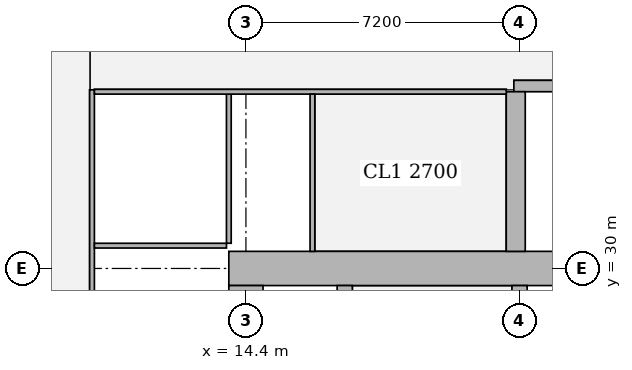
"""IFC4 building model, lengths in metres.
Left out: names, types, materials, properties, quantities, classifications, styles, units other than length and angle.
Written with IfcOpenShell. Run it as: python <this file> out.ifc"""

import sys

from ifc_helpers import new_model, si_unit, direction, frame, frame_2d, origin, place, context, subcontext, project, spatial, rectangle, extrude, element, fill, save


model = new_model("IFC4")
c1 = context("Model", 3, precision=1e-05, world=origin(), true_north=direction((0.0, 1.0)))
c2 = subcontext(c1, "Body", "Model", "MODEL_VIEW")
j1 = project(units=[si_unit("LENGTHUNIT", "METRE"), si_unit("PLANEANGLEUNIT", "RADIAN")], contexts=[c1])
p1 = place(None, origin())
s1 = spatial("IfcSite", under=j1, at=p1, CompositionType="ELEMENT")
p2 = place(p1, origin())
s2 = spatial("IfcBuilding", under=s1, at=p2, CompositionType="ELEMENT")
p3 = place(p2, frame((0.0, 0.0, 180.8)))
s3 = spatial("IfcBuildingStorey", under=s2, at=p3, CompositionType="ELEMENT", Elevation=180.8)
p4 = place(p3, frame((13.95, 30.0, 0.0), z_axis=(0.0, 0.0, 1.0), x_axis=(1.0, 0.0, 0.0)))
e1 = element("IfcWall", 1, at=p4, inside=s3, PredefinedType="SHEAR", context=c2, shape_type="SweptSolid", body=[
    extrude(rectangle(XDim=15.3, YDim=0.9, at=frame_2d((7.65, 0.0))), origin(), (0.0, 0.0, 1.0), 3.75),
])
p5 = place(p4, frame((4.45, 0.0, 0.0)))
e2 = element("IfcOpeningElement", 2, at=p5, cuts=e1, PredefinedType="OPENING", context=c2, shape_type="SweptSolid", body=[
    extrude(rectangle(XDim=1.8, YDim=2.1, at=frame_2d((0.9, 1.05))), frame((0.0, 0.46, 0.0), z_axis=(0.0, -1.0, 0.0), x_axis=(1.0, 0.0, 0.0)), (0.0, 0.0, 1.0), 0.92),
])
p6 = place(p4, frame((10.7, 0.0, 0.0)))
e3 = element("IfcOpeningElement", 3, at=p6, cuts=e1, PredefinedType="OPENING", context=c2, shape_type="SweptSolid", body=[
    extrude(rectangle(XDim=1.1, YDim=2.1, at=frame_2d((0.55, 1.05))), frame((0.0, 0.46, 0.0), z_axis=(0.0, -1.0, 0.0), x_axis=(1.0, 0.0, 0.0)), (0.0, 0.0, 1.0), 0.92),
])
p7 = place(p3, frame((14.4, 15.45, 0.0), z_axis=(0.0, 0.0, 1.0), x_axis=(0.0, 1.0, 0.0)))
e4 = element("IfcWall", 4, at=p7, inside=s3, PredefinedType="SHEAR", context=c2, shape_type="SweptSolid", body=[
    extrude(rectangle(XDim=14.1, YDim=0.9, at=frame_2d((7.05, 0.0))), origin(), (0.0, 0.0, 1.0), 3.75),
])
p8 = place(p3, frame((17.0, 15.45, 0.0), z_axis=(0.0, 0.0, 1.0), x_axis=(0.0, 1.0, 0.0)))
e5 = element("IfcWall", 5, at=p8, inside=s3, PredefinedType="SHEAR", context=c2, shape_type="SweptSolid", body=[
    extrude(rectangle(XDim=14.1, YDim=0.4, at=frame_2d((7.05, 0.0))), origin(), (0.0, 0.0, 1.0), 3.75),
])
p9 = place(p8, frame((0.925, 0.0, 0.0)))
e6 = element("IfcOpeningElement", 6, at=p9, cuts=e5, PredefinedType="OPENING", context=c2, shape_type="SweptSolid", body=[
    extrude(rectangle(XDim=1.0, YDim=2.1, at=frame_2d((0.5, 1.05))), frame((0.0, 0.21, 0.0), z_axis=(0.0, -1.0, 0.0), x_axis=(1.0, 0.0, 0.0)), (0.0, 0.0, 1.0), 0.42),
])
p10 = place(p8, frame((4.675, 0.0, 0.0)))
e7 = element("IfcOpeningElement", 7, at=p10, cuts=e5, PredefinedType="OPENING", context=c2, shape_type="SweptSolid", body=[
    extrude(rectangle(XDim=1.0, YDim=2.1, at=frame_2d((0.5, 1.05))), frame((0.0, 0.21, 0.0), z_axis=(0.0, -1.0, 0.0), x_axis=(1.0, 0.0, 0.0)), (0.0, 0.0, 1.0), 0.42),
])
p11 = place(p8, frame((8.425, 0.0, 0.0)))
e8 = element("IfcOpeningElement", 8, at=p11, cuts=e5, PredefinedType="OPENING", context=c2, shape_type="SweptSolid", body=[
    extrude(rectangle(XDim=1.0, YDim=2.1, at=frame_2d((0.5, 1.05))), frame((0.0, 0.21, 0.0), z_axis=(0.0, -1.0, 0.0), x_axis=(1.0, 0.0, 0.0)), (0.0, 0.0, 1.0), 0.42),
])
p12 = place(p8, frame((12.175, 0.0, 0.0)))
e9 = element("IfcOpeningElement", 9, at=p12, cuts=e5, PredefinedType="OPENING", context=c2, shape_type="SweptSolid", body=[
    extrude(rectangle(XDim=1.0, YDim=2.1, at=frame_2d((0.5, 1.05))), frame((0.0, 0.21, 0.0), z_axis=(0.0, -1.0, 0.0), x_axis=(1.0, 0.0, 0.0)), (0.0, 0.0, 1.0), 0.42),
])
p13 = place(p3, frame((21.6, 15.45, 0.0), z_axis=(0.0, 0.0, 1.0), x_axis=(0.0, 1.0, 0.0)))
e10 = element("IfcWall", 10, at=p13, inside=s3, PredefinedType="SHEAR", context=c2, shape_type="SweptSolid", body=[
    extrude(rectangle(XDim=14.1, YDim=0.4, at=frame_2d((7.05, 0.0))), origin(), (0.0, 0.0, 1.0), 3.75),
])
p14 = place(p13, frame((0.875, 0.0, 0.0)))
e11 = element("IfcOpeningElement", 11, at=p14, cuts=e10, PredefinedType="OPENING", context=c2, shape_type="SweptSolid", body=[
    extrude(rectangle(XDim=1.1, YDim=2.1, at=frame_2d((0.55, 1.05))), frame((0.0, 0.21, 0.0), z_axis=(0.0, -1.0, 0.0), x_axis=(1.0, 0.0, 0.0)), (0.0, 0.0, 1.0), 0.42),
])
p15 = place(p13, frame((4.625, 0.0, 0.0)))
e12 = element("IfcOpeningElement", 12, at=p15, cuts=e10, PredefinedType="OPENING", context=c2, shape_type="SweptSolid", body=[
    extrude(rectangle(XDim=1.1, YDim=2.1, at=frame_2d((0.55, 1.05))), frame((0.0, 0.21, 0.0), z_axis=(0.0, -1.0, 0.0), x_axis=(1.0, 0.0, 0.0)), (0.0, 0.0, 1.0), 0.42),
])
p16 = place(p13, frame((8.375, 0.0, 0.0)))
e13 = element("IfcOpeningElement", 13, at=p16, cuts=e10, PredefinedType="OPENING", context=c2, shape_type="SweptSolid", body=[
    extrude(rectangle(XDim=1.1, YDim=2.1, at=frame_2d((0.55, 1.05))), frame((0.0, 0.21, 0.0), z_axis=(0.0, -1.0, 0.0), x_axis=(1.0, 0.0, 0.0)), (0.0, 0.0, 1.0), 0.42),
])
p17 = place(p13, frame((12.125, 0.0, 0.0)))
e14 = element("IfcOpeningElement", 14, at=p17, cuts=e10, PredefinedType="OPENING", context=c2, shape_type="SweptSolid", body=[
    extrude(rectangle(XDim=1.1, YDim=2.1, at=frame_2d((0.55, 1.05))), frame((0.0, 0.21, 0.0), z_axis=(0.0, -1.0, 0.0), x_axis=(1.0, 0.0, 0.0)), (0.0, 0.0, 1.0), 0.42),
])
p18 = place(p3, frame((21.45, 34.8, 0.0), z_axis=(0.0, 0.0, 1.0), x_axis=(1.0, 0.0, 0.0)))
e15 = element("IfcWall", 15, at=p18, inside=s3, PredefinedType="SHEAR", context=c2, shape_type="SweptSolid", body=[
    extrude(rectangle(XDim=7.5, YDim=0.3, at=frame_2d((3.75, 0.0))), origin(), (0.0, 0.0, 1.0), 3.75),
])
p19 = place(p18, frame((0.5, 0.0, 0.0)))
e16 = element("IfcOpeningElement", 16, at=p19, cuts=e15, PredefinedType="OPENING", context=c2, shape_type="SweptSolid", body=[
    extrude(rectangle(XDim=1.1, YDim=2.1, at=frame_2d((0.55, 1.05))), frame((0.0, 0.16, 0.0), z_axis=(0.0, -1.0, 0.0), x_axis=(1.0, 0.0, 0.0)), (0.0, 0.0, 1.0), 0.32),
])
p20 = place(p3, frame((21.5, 30.45, 0.0), z_axis=(0.0, 0.0, 1.0), x_axis=(0.0, 1.0, 0.0)))
e17 = element("IfcWall", 17, at=p20, inside=s3, PredefinedType="SHEAR", context=c2, shape_type="SweptSolid", body=[
    extrude(rectangle(XDim=4.2, YDim=0.5, at=frame_2d((2.1, 0.0))), origin(), (0.0, 0.0, 1.0), 3.75),
])
p21 = place(p3, frame((10.35, 10.3, 0.0), z_axis=(0.0, 0.0, 1.0), x_axis=(0.0, 1.0, 0.0)))
e18 = element("IfcWall", 18, at=p21, inside=s3, PredefinedType="PARTITIONING", context=c2, shape_type="SweptSolid", body=[
    extrude(rectangle(XDim=24.4, YDim=0.125, at=frame_2d((12.2, 0.0))), origin(), (0.0, 0.0, 1.0), 3.5),
])
p22 = place(p21, frame((1.55, 0.0, 0.0)))
e19 = element("IfcOpeningElement", 19, at=p22, cuts=e18, PredefinedType="OPENING", context=c2, shape_type="SweptSolid", body=[
    extrude(rectangle(XDim=1.0, YDim=2.1, at=frame_2d((0.5, 1.05))), frame((0.0, 0.073, 0.0), z_axis=(0.0, -1.0, 0.0), x_axis=(1.0, 0.0, 0.0)), (0.0, 0.0, 1.0), 0.145),
])
p23 = place(p21, frame((7.65, 0.0, 0.0)))
e20 = element("IfcOpeningElement", 20, at=p23, cuts=e18, PredefinedType="OPENING", context=c2, shape_type="SweptSolid", body=[
    extrude(rectangle(XDim=1.0, YDim=2.1, at=frame_2d((0.5, 1.05))), frame((0.0, 0.073, 0.0), z_axis=(0.0, -1.0, 0.0), x_axis=(1.0, 0.0, 0.0)), (0.0, 0.0, 1.0), 0.145),
])
p24 = place(p21, frame((15.75, 0.0, 0.0)))
e21 = element("IfcOpeningElement", 21, at=p24, cuts=e18, PredefinedType="OPENING", context=c2, shape_type="SweptSolid", body=[
    extrude(rectangle(XDim=1.0, YDim=2.1, at=frame_2d((0.5, 1.05))), frame((0.0, 0.073, 0.0), z_axis=(0.0, -1.0, 0.0), x_axis=(1.0, 0.0, 0.0)), (0.0, 0.0, 1.0), 0.145),
])
p25 = place(p21, frame((21.85, 0.0, 0.0)))
e22 = element("IfcOpeningElement", 22, at=p25, cuts=e18, PredefinedType="OPENING", context=c2, shape_type="SweptSolid", body=[
    extrude(rectangle(XDim=1.0, YDim=2.1, at=frame_2d((0.5, 1.05))), frame((0.0, 0.073, 0.0), z_axis=(0.0, -1.0, 0.0), x_axis=(1.0, 0.0, 0.0)), (0.0, 0.0, 1.0), 0.145),
])
p26 = place(p3, frame((10.413, 30.6, 0.0), z_axis=(0.0, 0.0, 1.0), x_axis=(1.0, 0.0, 0.0)))
e23 = element("IfcWall", 23, at=p26, inside=s3, PredefinedType="PARTITIONING", context=c2, shape_type="SweptSolid", body=[
    extrude(rectangle(XDim=3.475, YDim=0.125, at=frame_2d((1.737, 0.0))), origin(), (0.0, 0.0, 1.0), 3.5),
])
p27 = place(p3, frame((13.95, 30.663, 0.0), z_axis=(0.0, 0.0, 1.0), x_axis=(0.0, 1.0, 0.0)))
e24 = element("IfcWall", 24, at=p27, inside=s3, PredefinedType="PARTITIONING", context=c2, shape_type="SweptSolid", body=[
    extrude(rectangle(XDim=3.924, YDim=0.125, at=frame_2d((1.962, 0.0))), origin(), (0.0, 0.0, 1.0), 3.5),
])
p28 = place(p3, frame((10.413, 34.65, 0.0), z_axis=(0.0, 0.0, 1.0), x_axis=(1.0, 0.0, 0.0)))
e25 = element("IfcWall", 25, at=p28, inside=s3, PredefinedType="PARTITIONING", context=c2, shape_type="SweptSolid", body=[
    extrude(rectangle(XDim=10.837, YDim=0.125, at=frame_2d((5.418, 0.0))), origin(), (0.0, 0.0, 1.0), 3.5),
])
p29 = place(p28, frame((7.487, 0.0, 0.0)))
e26 = element("IfcOpeningElement", 26, at=p29, cuts=e25, PredefinedType="OPENING", context=c2, shape_type="SweptSolid", body=[
    extrude(rectangle(XDim=1.8, YDim=2.1, at=frame_2d((0.9, 1.05))), frame((0.0, 0.073, 0.0), z_axis=(0.0, -1.0, 0.0), x_axis=(1.0, 0.0, 0.0)), (0.0, 0.0, 1.0), 0.145),
])
p30 = place(p3, frame((16.15, 30.45, 0.0), z_axis=(0.0, 0.0, 1.0), x_axis=(0.0, 1.0, 0.0)))
e27 = element("IfcWall", 27, at=p30, inside=s3, PredefinedType="PARTITIONING", context=c2, shape_type="SweptSolid", body=[
    extrude(rectangle(XDim=4.137, YDim=0.125, at=frame_2d((2.068, 0.0))), origin(), (0.0, 0.0, 1.0), 3.5),
])
p31 = place(p30, frame((1.625, 0.0, 0.0)))
e28 = element("IfcOpeningElement", 28, at=p31, cuts=e27, PredefinedType="OPENING", context=c2, shape_type="SweptSolid", body=[
    extrude(rectangle(XDim=1.0, YDim=2.1, at=frame_2d((0.5, 1.05))), frame((0.0, 0.073, 0.0), z_axis=(0.0, -1.0, 0.0), x_axis=(1.0, 0.0, 0.0)), (0.0, 0.0, 1.0), 0.145),
])
p32 = place(p25, origin())
e29 = element("IfcDoor", 29, at=p32, inside=s3, OperationType="SINGLE_SWING_LEFT", PredefinedType="DOOR", context=c2, shape_type="SweptSolid", body=[
    extrude(rectangle(XDim=1.0, YDim=2.1, at=frame_2d((0.5, 1.05))), frame((0.0, 0.025, 0.0), z_axis=(0.0, -1.0, 0.0), x_axis=(1.0, 0.0, 0.0)), (0.0, 0.0, 1.0), 0.05),
])
fill(e22, e29)
p33 = place(p31, origin())
e30 = element("IfcDoor", 30, at=p33, inside=s3, OperationType="SINGLE_SWING_RIGHT", PredefinedType="DOOR", context=c2, shape_type="SweptSolid", body=[
    extrude(rectangle(XDim=1.0, YDim=2.1, at=frame_2d((0.5, 1.05))), frame((0.0, 0.025, 0.0), z_axis=(0.0, -1.0, 0.0), x_axis=(1.0, 0.0, 0.0)), (0.0, 0.0, 1.0), 0.05),
])
fill(e28, e30)
p34 = place(p29, origin())
e31 = element("IfcDoor", 31, at=p34, inside=s3, OperationType="DOUBLE_DOOR_SINGLE_SWING", PredefinedType="DOOR", context=c2, shape_type="SweptSolid", body=[
    extrude(rectangle(XDim=1.8, YDim=2.1, at=frame_2d((0.9, 1.05))), frame((0.0, 0.025, 0.0), z_axis=(0.0, -1.0, 0.0), x_axis=(1.0, 0.0, 0.0)), (0.0, 0.0, 1.0), 0.05),
])
fill(e26, e31)
p35 = place(p5, origin())
e32 = element("IfcDoor", 32, at=p35, inside=s3, OperationType="DOUBLE_DOOR_SINGLE_SWING", PredefinedType="DOOR", context=c2, shape_type="SweptSolid", body=[
    extrude(rectangle(XDim=1.8, YDim=2.1, at=frame_2d((0.9, 1.05))), frame((0.0, 0.025, 0.0), z_axis=(0.0, -1.0, 0.0), x_axis=(1.0, 0.0, 0.0)), (0.0, 0.0, 1.0), 0.05),
])
fill(e2, e32)
p36 = place(p19, origin())
e33 = element("IfcDoor", 33, at=p36, inside=s3, OperationType="SINGLE_SWING_RIGHT", PredefinedType="DOOR", context=c2, shape_type="SweptSolid", body=[
    extrude(rectangle(XDim=1.1, YDim=2.1, at=frame_2d((0.55, 1.05))), frame((0.0, 0.025, 0.0), z_axis=(0.0, -1.0, 0.0), x_axis=(1.0, 0.0, 0.0)), (0.0, 0.0, 1.0), 0.05),
])
fill(e16, e33)
save(model, sys.argv[1])
